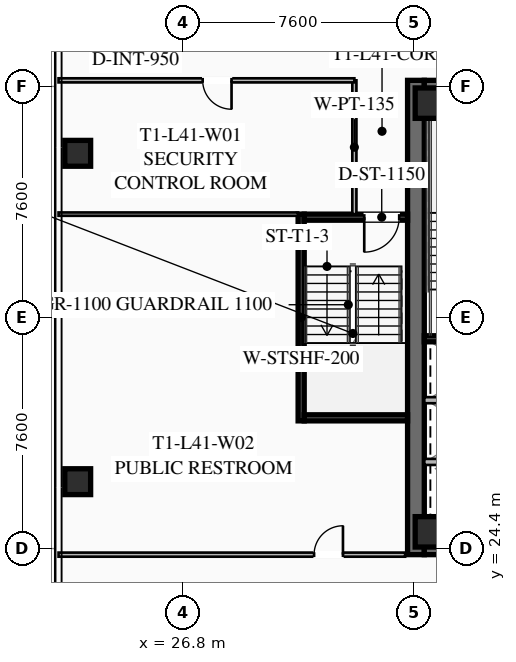
"""IFC4 building model, lengths in metres.
Left out: names, types, materials, properties, quantities, classifications, styles, units other than length and angle.
Written with IfcOpenShell. Run it as: python <this file> out.ifc"""

import sys

from ifc_helpers import new_model, si_unit, direction, frame, frame_2d, origin, origin_2d, place, context, subcontext, project, spatial, rectangle, hollow_rectangle, extrude, element, fill, save


model = new_model("IFC4")
c1 = context("Model", 3, precision=1e-05, world=origin(), true_north=direction((0.0, 1.0)))
c2 = subcontext(c1, "Body", "Model", "MODEL_VIEW")
j1 = project(units=[si_unit("LENGTHUNIT", "METRE"), si_unit("PLANEANGLEUNIT", "RADIAN")], contexts=[c1])
p1 = place(None, origin())
s1 = spatial("IfcSite", under=j1, at=p1, CompositionType="ELEMENT")
p2 = place(p1, origin())
s2 = spatial("IfcBuilding", under=s1, at=p2, CompositionType="ELEMENT")
p3 = place(p2, frame((0.0, 0.0, 153.45)))
s3 = spatial("IfcBuildingStorey", under=s2, at=p3, CompositionType="ELEMENT", Elevation=153.45)
p4 = place(p3, frame((34.475, 24.2, 0.0), z_axis=(0.0, 0.0, 1.0), x_axis=(0.0, 1.0, 0.0)))
e1 = element("IfcWall", 1, at=p4, inside=s3, PredefinedType="SHEAR", context=c2, shape_type="SweptSolid", body=[
    extrude(rectangle(XDim=15.6, YDim=0.55, at=frame_2d((7.8, 0.0))), origin(), (0.0, 0.0, 1.0), 3.55),
])
p5 = place(p3, frame((49.25, 24.475, 0.0), z_axis=(0.0, 0.0, 1.0), x_axis=(-1.0, 0.0, 0.0)))
e2 = element("IfcWall", 2, at=p5, inside=s3, PredefinedType="SHEAR", context=c2, shape_type="SweptSolid", body=[
    extrude(rectangle(XDim=14.5, YDim=0.55, at=frame_2d((7.25, 0.0))), origin(), (0.0, 0.0, 1.0), 3.55),
])
p6 = place(p5, frame((8.95, 0.0, 0.0)))
e3 = element("IfcOpeningElement", 3, at=p6, cuts=e2, PredefinedType="OPENING", context=c2, shape_type="SweptSolid", body=[
    extrude(rectangle(XDim=1.25, YDim=2.25, at=frame_2d((0.625, 1.125))), frame((0.0, 0.285, 0.0), z_axis=(0.0, -1.0, 0.0), x_axis=(1.0, 0.0, 0.0)), (0.0, 0.0, 1.0), 0.57),
])
p7 = place(p5, frame((3.9, 0.0, 0.0)))
e4 = element("IfcOpeningElement", 4, at=p7, cuts=e2, PredefinedType="OPENING", context=c2, shape_type="SweptSolid", body=[
    extrude(rectangle(XDim=1.25, YDim=2.25, at=frame_2d((0.625, 1.125))), frame((0.0, 0.285, 0.0), z_axis=(0.0, -1.0, 0.0), x_axis=(1.0, 0.0, 0.0)), (0.0, 0.0, 1.0), 0.57),
])
p8 = place(p3, frame((34.75, 39.525, 0.0), z_axis=(0.0, 0.0, 1.0), x_axis=(1.0, 0.0, 0.0)))
e5 = element("IfcWall", 5, at=p8, inside=s3, PredefinedType="SHEAR", context=c2, shape_type="SweptSolid", body=[
    extrude(rectangle(XDim=14.5, YDim=0.55, at=frame_2d((7.25, 0.0))), origin(), (0.0, 0.0, 1.0), 3.55),
])
p9 = place(p8, frame((4.3, 0.0, 0.0)))
e6 = element("IfcOpeningElement", 6, at=p9, cuts=e5, PredefinedType="OPENING", context=c2, shape_type="SweptSolid", body=[
    extrude(rectangle(XDim=1.25, YDim=2.25, at=frame_2d((0.625, 1.125))), frame((0.0, 0.285, 0.0), z_axis=(0.0, -1.0, 0.0), x_axis=(1.0, 0.0, 0.0)), (0.0, 0.0, 1.0), 0.57),
])
p10 = place(p8, frame((9.35, 0.0, 0.0)))
e7 = element("IfcOpeningElement", 7, at=p10, cuts=e5, PredefinedType="OPENING", context=c2, shape_type="SweptSolid", body=[
    extrude(rectangle(XDim=1.25, YDim=2.25, at=frame_2d((0.625, 1.125))), frame((0.0, 0.285, 0.0), z_axis=(0.0, -1.0, 0.0), x_axis=(1.0, 0.0, 0.0)), (0.0, 0.0, 1.0), 0.57),
])
for number, where, z_axis, x_axis in (
    (8, (34.95, 24.95, 0.0), (0.0, 0.0, 1.0), (1.0, 0.0, 0.0)),
    (9, (34.95, 39.05, 0.0), (0.0, 0.0, 1.0), (1.0, 0.0, 0.0)),
):
    element("IfcColumn", number, at=place(p3, frame(where, z_axis=z_axis, x_axis=x_axis)), inside=s3, PredefinedType="COLUMN", context=c2, shape_type="SweptSolid", body=[
        extrude(hollow_rectangle(XDim=1.0, YDim=1.0, WallThickness=0.04, at=origin_2d()), origin(), (0.0, 0.0, 1.0), 3.37),
    ])
for number, where, z_axis, x_axis in (
    (10, (23.35, 37.4, 0.0), (0.0, 0.0, 1.0), (1.0, 0.0, 0.0)),
    (11, (23.35, 26.6, 0.0), (0.0, 0.0, 1.0), (1.0, 0.0, 0.0)),
):
    element("IfcColumn", number, at=place(p3, frame(where, z_axis=z_axis, x_axis=x_axis)), inside=s3, PredefinedType="COLUMN", context=c2, shape_type="SweptSolid", body=[
        extrude(hollow_rectangle(XDim=0.85, YDim=0.85, WallThickness=0.035, at=origin_2d()), origin(), (0.0, 0.0, 1.0), 3.37),
    ])
for number, where, z_axis, x_axis in (
    (12, (34.75, 31.3, 0.0), (0.0, 0.0, 1.0), (1.0, 0.0, 0.0)),
    (13, (34.75, 38.7, 0.0), (0.0, 0.0, 1.0), (1.0, 0.0, 0.0)),
):
    element("IfcWall", number, at=place(p3, frame(where, z_axis=z_axis, x_axis=x_axis)), inside=s3, PredefinedType="SHEAR", context=c2, shape_type="SweptSolid", body=[
        extrude(rectangle(XDim=3.55, YDim=0.2, at=frame_2d((1.775, 0.0))), origin(), (0.0, 0.0, 1.0), 3.37),
    ])
for number, where, z_axis, x_axis in (
    (14, (34.75, 27.25, 0.0), (0.0, 0.0, 1.0), (1.0, 0.0, 0.0)),
    (15, (34.75, 29.28, 0.0), (0.0, 0.0, 1.0), (1.0, 0.0, 0.0)),
):
    element("IfcWall", number, at=place(p3, frame(where, z_axis=z_axis, x_axis=x_axis)), inside=s3, PredefinedType="SOLIDWALL", context=c2, shape_type="SweptSolid", body=[
        extrude(rectangle(XDim=3.2, YDim=0.2, at=frame_2d((1.6, 0.0))), origin(), (0.0, 0.0, 1.0), 3.37),
    ])
p11 = place(p3, frame((30.7, 28.6, 0.0), z_axis=(0.0, 0.0, 1.0), x_axis=(0.0, 1.0, 0.0)))
e16 = element("IfcWall", 16, at=p11, inside=s3, PredefinedType="SHEAR", context=c2, shape_type="SweptSolid", body=[
    extrude(rectangle(XDim=6.8, YDim=0.2, at=frame_2d((3.4, 0.0))), origin(), (0.0, 0.0, 1.0), 3.37),
])
p12 = place(p3, frame((34.2, 35.3, 0.0), z_axis=(0.0, 0.0, 1.0), x_axis=(-1.0, 0.0, 0.0)))
e17 = element("IfcWall", 17, at=p12, inside=s3, PredefinedType="SHEAR", context=c2, shape_type="SweptSolid", body=[
    extrude(rectangle(XDim=3.4, YDim=0.2, at=frame_2d((1.7, 0.0))), origin(), (0.0, 0.0, 1.0), 3.37),
])
p13 = place(p12, frame((0.275, 0.0, 0.0)))
e18 = element("IfcOpeningElement", 18, at=p13, cuts=e17, PredefinedType="OPENING", context=c2, shape_type="SweptSolid", body=[
    extrude(rectangle(XDim=1.15, YDim=2.2, at=frame_2d((0.575, 1.1))), frame((0.0, 0.11, 0.0), z_axis=(0.0, -1.0, 0.0), x_axis=(1.0, 0.0, 0.0)), (0.0, 0.0, 1.0), 0.22),
])
p14 = place(p3, frame((30.8, 28.7, 0.0), z_axis=(0.0, 0.0, 1.0), x_axis=(1.0, 0.0, 0.0)))
e19 = element("IfcWall", 19, at=p14, inside=s3, PredefinedType="SHEAR", context=c2, shape_type="SweptSolid", body=[
    extrude(rectangle(XDim=3.4, YDim=0.2, at=frame_2d((1.7, 0.0))), origin(), (0.0, 0.0, 1.0), 3.37),
])
p15 = place(p3, frame((32.45, 35.4, 0.0), z_axis=(0.0, 0.0, 1.0), x_axis=(0.0, 1.0, 0.0)))
e20 = element("IfcWall", 20, at=p15, inside=s3, PredefinedType="PARTITIONING", context=c2, shape_type="SweptSolid", body=[
    extrude(rectangle(XDim=4.4, YDim=0.135, at=frame_2d((2.2, 0.0))), origin(), (0.0, 0.0, 1.0), 2.513),
])
p16 = place(p3, frame((32.45, 39.8, 0.0), z_axis=(0.0, 0.0, 1.0), x_axis=(-1.0, 0.0, 0.0)))
e21 = element("IfcWall", 21, at=p16, inside=s3, PredefinedType="PARTITIONING", context=c2, shape_type="SweptSolid", body=[
    extrude(rectangle(XDim=9.73, YDim=0.135, at=frame_2d((4.865, 0.0))), origin(), (0.0, 0.0, 1.0), 2.513),
])
p17 = place(p16, frame((4.04, 0.0, 0.0)))
e22 = element("IfcOpeningElement", 22, at=p17, cuts=e21, PredefinedType="OPENING", context=c2, shape_type="SweptSolid", body=[
    extrude(rectangle(XDim=0.95, YDim=2.05, at=frame_2d((0.475, 1.025))), frame((0.0, 0.077, 0.0), z_axis=(0.0, -1.0, 0.0), x_axis=(1.0, 0.0, 0.0)), (0.0, 0.0, 1.0), 0.155),
])
p18 = place(p3, frame((22.72, 24.2, 0.0), z_axis=(0.0, 0.0, 1.0), x_axis=(1.0, 0.0, 0.0)))
e23 = element("IfcWall", 23, at=p18, inside=s3, PredefinedType="PARTITIONING", context=c2, shape_type="SweptSolid", body=[
    extrude(rectangle(XDim=11.4, YDim=0.135, at=frame_2d((5.7, 0.0))), origin(), (0.0, 0.0, 1.0), 2.513),
])
p19 = place(p18, frame((8.405, 0.0, 0.0)))
e24 = element("IfcOpeningElement", 24, at=p19, cuts=e23, PredefinedType="OPENING", context=c2, shape_type="SweptSolid", body=[
    extrude(rectangle(XDim=0.95, YDim=2.05, at=frame_2d((0.475, 1.025))), frame((0.0, 0.077, 0.0), z_axis=(0.0, -1.0, 0.0), x_axis=(1.0, 0.0, 0.0)), (0.0, 0.0, 1.0), 0.155),
])
p20 = place(p3, frame((30.6, 35.4, 0.0), z_axis=(0.0, 0.0, 1.0), x_axis=(-1.0, 0.0, 0.0)))
e25 = element("IfcWall", 25, at=p20, inside=s3, PredefinedType="PARTITIONING", context=c2, shape_type="SweptSolid", body=[
    extrude(rectangle(XDim=7.88, YDim=0.11, at=frame_2d((3.94, 0.0))), origin(), (0.0, 0.0, 1.0), 2.513),
])
p21 = place(p13, origin())
e26 = element("IfcDoor", 26, at=p21, inside=s3, OperationType="SINGLE_SWING_RIGHT", PredefinedType="DOOR", context=c2, shape_type="SweptSolid", body=[
    extrude(rectangle(XDim=1.15, YDim=2.2, at=frame_2d((0.575, 1.1))), frame((0.0, 0.025, 0.0), z_axis=(0.0, -1.0, 0.0), x_axis=(1.0, 0.0, 0.0)), (0.0, 0.0, 1.0), 0.05),
])
fill(e18, e26)
p22 = place(p17, origin())
e27 = element("IfcDoor", 27, at=p22, inside=s3, OperationType="SINGLE_SWING_LEFT", PredefinedType="DOOR", context=c2, shape_type="SweptSolid", body=[
    extrude(rectangle(XDim=0.95, YDim=2.05, at=frame_2d((0.475, 1.025))), frame((0.0, 0.025, 0.0), z_axis=(0.0, -1.0, 0.0), x_axis=(1.0, 0.0, 0.0)), (0.0, 0.0, 1.0), 0.05),
])
fill(e22, e27)
p23 = place(p19, origin())
e28 = element("IfcDoor", 28, at=p23, inside=s3, OperationType="SINGLE_SWING_RIGHT", PredefinedType="DOOR", context=c2, shape_type="SweptSolid", body=[
    extrude(rectangle(XDim=0.95, YDim=2.05, at=frame_2d((0.475, 1.025))), frame((0.0, 0.025, 0.0), z_axis=(0.0, -1.0, 0.0), x_axis=(1.0, 0.0, 0.0)), (0.0, 0.0, 1.0), 0.05),
])
fill(e24, e28)
save(model, sys.argv[1])
